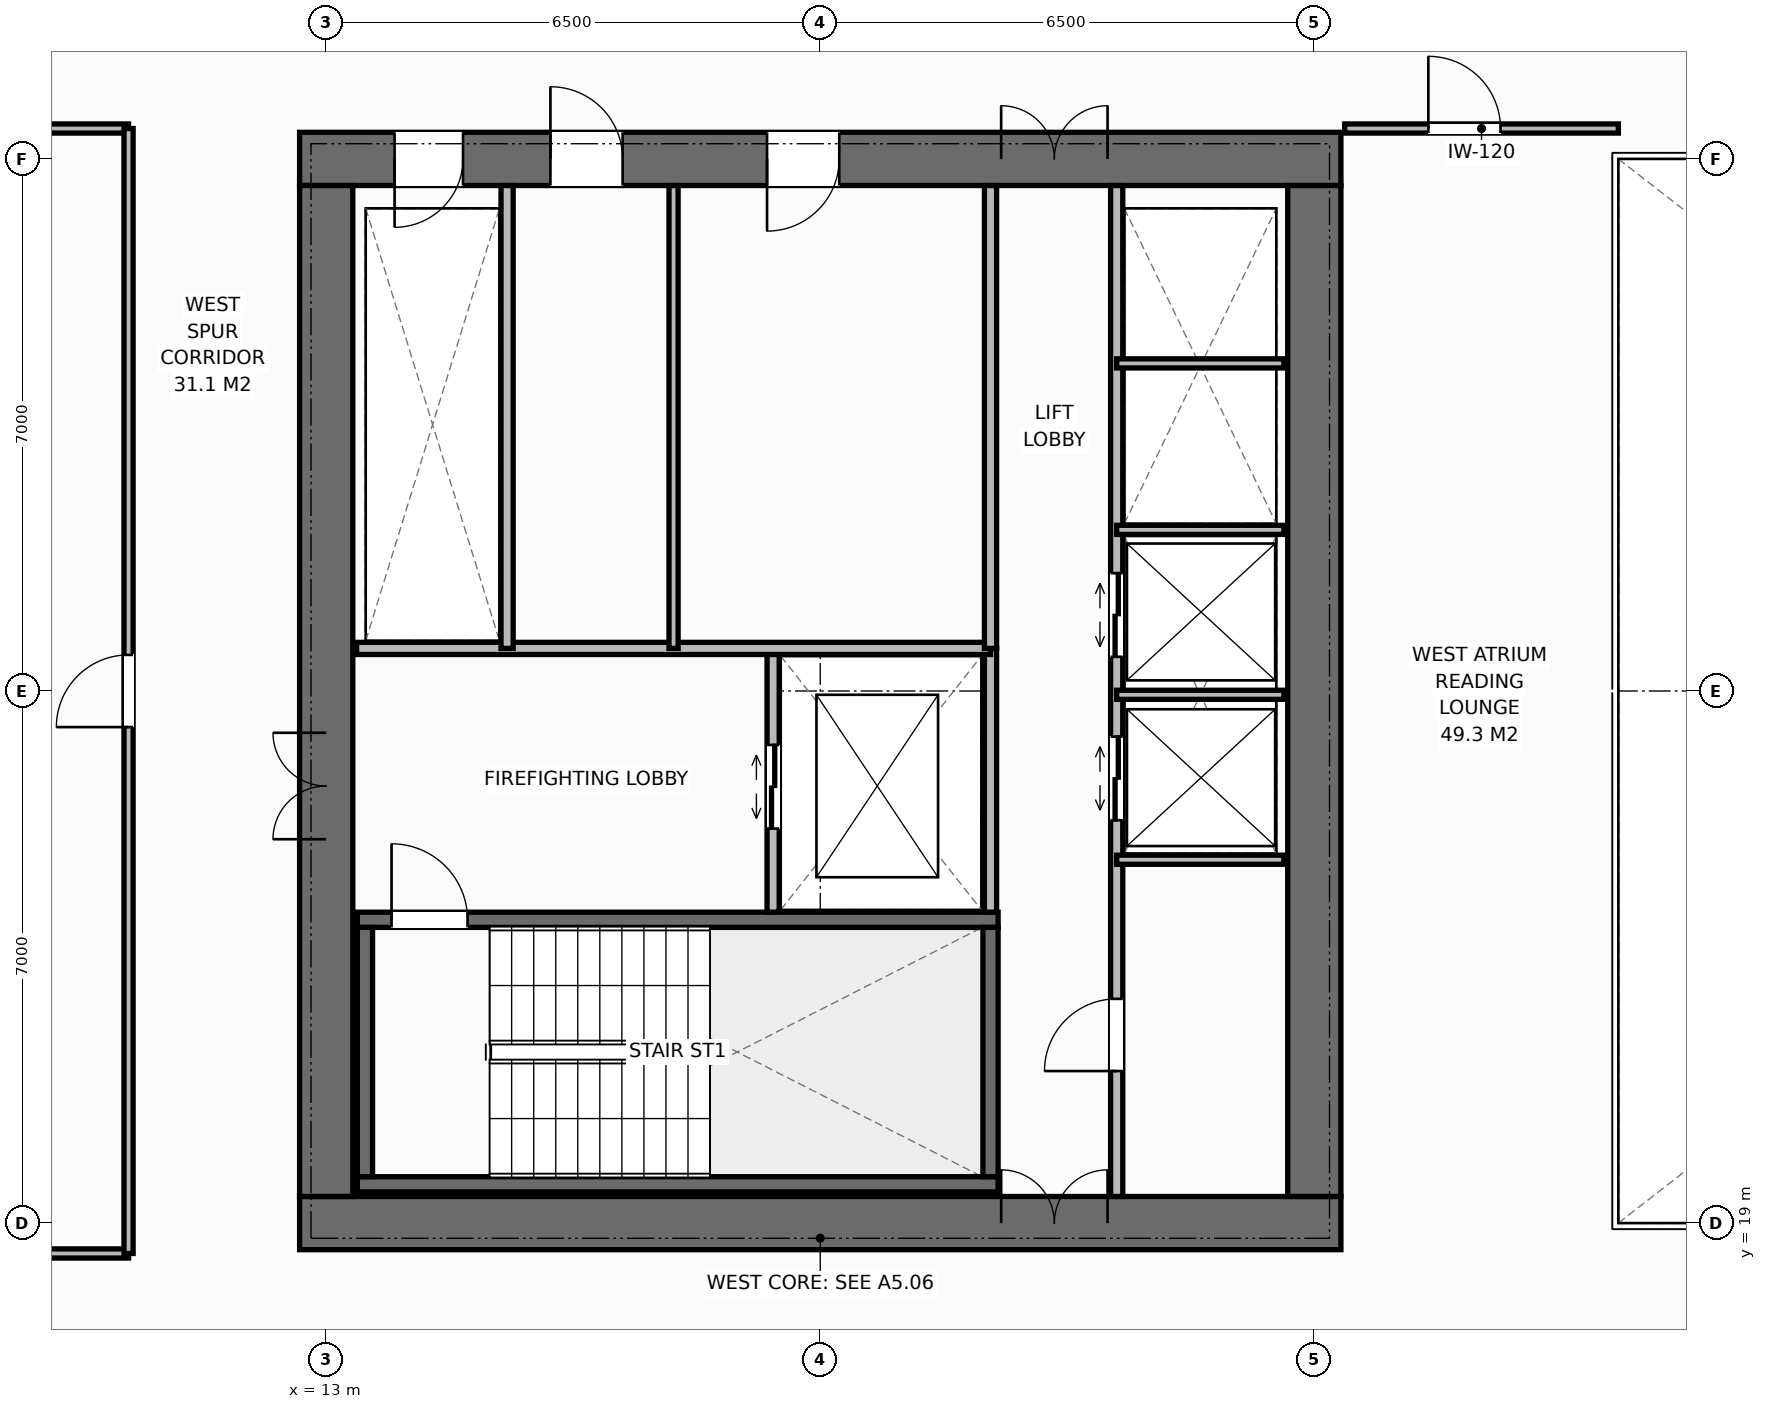
"""IFC4 building model, lengths in metres.
Left out: names, types, materials, properties, quantities, classifications, styles, units other than length and angle.
Written with IfcOpenShell. Run it as: python <this file> out.ifc"""

import sys

from ifc_helpers import new_model, si_unit, direction, frame, frame_2d, origin, place, context, subcontext, project, spatial, rectangle, extrude, element, fill, save


model = new_model("IFC4")
c1 = context("Model", 3, precision=1e-05, world=origin(), true_north=direction((0.0, 1.0)))
c2 = subcontext(c1, "Body", "Model", "MODEL_VIEW")
j1 = project(units=[si_unit("LENGTHUNIT", "METRE"), si_unit("PLANEANGLEUNIT", "RADIAN")], contexts=[c1])
p1 = place(None, origin())
s1 = spatial("IfcSite", under=j1, at=p1, CompositionType="ELEMENT")
p2 = place(p1, origin())
s2 = spatial("IfcBuilding", under=s1, at=p2, CompositionType="ELEMENT")
p3 = place(p2, frame((0.0, 0.0, 135.4)))
s3 = spatial("IfcBuildingStorey", under=s2, at=p3, CompositionType="ELEMENT", Elevation=135.4)
p4 = place(p3, frame((12.65, 19.0, 0.0), z_axis=(0.0, 0.0, 1.0), x_axis=(1.0, 0.0, 0.0)))
e1 = element("IfcWall", 1, at=p4, inside=s3, PredefinedType="SHEAR", context=c2, shape_type="SweptSolid", body=[
    extrude(rectangle(XDim=13.7, YDim=0.7, at=frame_2d((6.85, 0.0))), origin(), (0.0, 0.0, 1.0), 3.8),
])
p5 = place(p4, frame((9.23, 0.0, 0.0)))
e2 = element("IfcOpeningElement", 2, at=p5, cuts=e1, PredefinedType="OPENING", context=c2, shape_type="SweptSolid", body=[
    extrude(rectangle(XDim=1.4, YDim=2.2, at=frame_2d((0.7, 1.1))), frame((0.0, 0.36, 0.0), z_axis=(0.0, -1.0, 0.0), x_axis=(1.0, 0.0, 0.0)), (0.0, 0.0, 1.0), 0.72),
])
p6 = place(p3, frame((12.65, 33.0, 0.0), z_axis=(0.0, 0.0, 1.0), x_axis=(1.0, 0.0, 0.0)))
e3 = element("IfcWall", 3, at=p6, inside=s3, PredefinedType="SHEAR", context=c2, shape_type="SweptSolid", body=[
    extrude(rectangle(XDim=13.7, YDim=0.7, at=frame_2d((6.85, 0.0))), origin(), (0.0, 0.0, 1.0), 3.8),
])
p7 = place(p6, frame((1.25, 0.0, 0.0)))
e4 = element("IfcOpeningElement", 4, at=p7, cuts=e3, PredefinedType="OPENING", context=c2, shape_type="SweptSolid", body=[
    extrude(rectangle(XDim=0.9, YDim=2.15, at=frame_2d((0.45, 1.075))), frame((0.0, 0.36, 0.0), z_axis=(0.0, -1.0, 0.0), x_axis=(1.0, 0.0, 0.0)), (0.0, 0.0, 1.0), 0.72),
])
p8 = place(p6, frame((3.3, 0.0, 0.0)))
e5 = element("IfcOpeningElement", 5, at=p8, cuts=e3, PredefinedType="OPENING", context=c2, shape_type="SweptSolid", body=[
    extrude(rectangle(XDim=0.95, YDim=2.15, at=frame_2d((0.475, 1.075))), frame((0.0, 0.36, 0.0), z_axis=(0.0, -1.0, 0.0), x_axis=(1.0, 0.0, 0.0)), (0.0, 0.0, 1.0), 0.72),
])
p9 = place(p6, frame((6.15, 0.0, 0.0)))
e6 = element("IfcOpeningElement", 6, at=p9, cuts=e3, PredefinedType="OPENING", context=c2, shape_type="SweptSolid", body=[
    extrude(rectangle(XDim=0.95, YDim=2.15, at=frame_2d((0.475, 1.075))), frame((0.0, 0.36, 0.0), z_axis=(0.0, -1.0, 0.0), x_axis=(1.0, 0.0, 0.0)), (0.0, 0.0, 1.0), 0.72),
])
p10 = place(p6, frame((9.23, 0.0, 0.0)))
e7 = element("IfcOpeningElement", 7, at=p10, cuts=e3, PredefinedType="OPENING", context=c2, shape_type="SweptSolid", body=[
    extrude(rectangle(XDim=1.4, YDim=2.2, at=frame_2d((0.7, 1.1))), frame((0.0, 0.36, 0.0), z_axis=(0.0, -1.0, 0.0), x_axis=(1.0, 0.0, 0.0)), (0.0, 0.0, 1.0), 0.72),
])
p11 = place(p3, frame((13.0, 19.35, 0.0), z_axis=(0.0, 0.0, 1.0), x_axis=(0.0, 1.0, 0.0)))
e8 = element("IfcWall", 8, at=p11, inside=s3, PredefinedType="SHEAR", context=c2, shape_type="SweptSolid", body=[
    extrude(rectangle(XDim=13.3, YDim=0.7, at=frame_2d((6.65, 0.0))), origin(), (0.0, 0.0, 1.0), 3.8),
])
p12 = place(p11, frame((4.7, 0.0, 0.0)))
e9 = element("IfcOpeningElement", 9, at=p12, cuts=e8, PredefinedType="OPENING", context=c2, shape_type="SweptSolid", body=[
    extrude(rectangle(XDim=1.4, YDim=2.2, at=frame_2d((0.7, 1.1))), frame((0.0, 0.36, 0.0), z_axis=(0.0, -1.0, 0.0), x_axis=(1.0, 0.0, 0.0)), (0.0, 0.0, 1.0), 0.72),
])
p13 = place(p3, frame((26.0, 19.35, 0.0), z_axis=(0.0, 0.0, 1.0), x_axis=(0.0, 1.0, 0.0)))
e10 = element("IfcWall", 10, at=p13, inside=s3, PredefinedType="SHEAR", context=c2, shape_type="SweptSolid", body=[
    extrude(rectangle(XDim=13.3, YDim=0.7, at=frame_2d((6.65, 0.0))), origin(), (0.0, 0.0, 1.0), 3.8),
])
p14 = place(p3, frame((13.41, 19.51, 0.0), z_axis=(0.0, 0.0, 1.0), x_axis=(1.0, 0.0, 0.0)))
e11 = element("IfcWall", 11, at=p14, inside=s3, PredefinedType="SHEAR", context=c2, shape_type="SweptSolid", body=[
    extrude(rectangle(XDim=8.43, YDim=0.2, at=frame_2d((4.215, 0.0))), origin(), (0.0, 0.0, 1.0), 3.8),
])
p15 = place(p3, frame((13.41, 22.99, 0.0), z_axis=(0.0, 0.0, 1.0), x_axis=(1.0, 0.0, 0.0)))
e12 = element("IfcWall", 12, at=p15, inside=s3, PredefinedType="SHEAR", context=c2, shape_type="SweptSolid", body=[
    extrude(rectangle(XDim=8.43, YDim=0.2, at=frame_2d((4.215, 0.0))), origin(), (0.0, 0.0, 1.0), 3.8),
])
p16 = place(p15, frame((0.45, 0.0, 0.0)))
e13 = element("IfcOpeningElement", 13, at=p16, cuts=e12, PredefinedType="OPENING", context=c2, shape_type="SweptSolid", body=[
    extrude(rectangle(XDim=1.0, YDim=2.15, at=frame_2d((0.5, 1.075))), frame((0.0, 0.11, 0.0), z_axis=(0.0, -1.0, 0.0), x_axis=(1.0, 0.0, 0.0)), (0.0, 0.0, 1.0), 0.22),
])
for number, where, z_axis, x_axis in (
    (14, (13.51, 19.61, 0.0), (0.0, 0.0, 1.0), (0.0, 1.0, 0.0)),
    (15, (21.74, 19.61, 0.0), (0.0, 0.0, 1.0), (0.0, 1.0, 0.0)),
):
    element("IfcWall", number, at=place(p3, frame(where, z_axis=z_axis, x_axis=x_axis)), inside=s3, PredefinedType="SHEAR", context=c2, shape_type="SweptSolid", body=[
        extrude(rectangle(XDim=3.28, YDim=0.2, at=frame_2d((1.64, 0.0))), origin(), (0.0, 0.0, 1.0), 3.8),
    ])
p17 = place(p3, frame((21.74, 23.09, 0.0), z_axis=(0.0, 0.0, 1.0), x_axis=(0.0, 1.0, 0.0)))
e16 = element("IfcWall", 16, at=p17, inside=s3, PredefinedType="STANDARD", context=c2, shape_type="SweptSolid", body=[
    extrude(rectangle(XDim=3.47, YDim=0.16, at=frame_2d((1.735, 0.0))), origin(), (0.0, 0.0, 1.0), 3.52),
])
p18 = place(p3, frame((18.88, 23.09, 0.0), z_axis=(0.0, 0.0, 1.0), x_axis=(0.0, 1.0, 0.0)))
e17 = element("IfcWall", 17, at=p18, inside=s3, PredefinedType="STANDARD", context=c2, shape_type="SweptSolid", body=[
    extrude(rectangle(XDim=3.47, YDim=0.16, at=frame_2d((1.735, 0.0))), origin(), (0.0, 0.0, 1.0), 3.52),
])
p19 = place(p18, frame((1.1, 0.0, 0.0)))
e18 = element("IfcOpeningElement", 18, at=p19, cuts=e17, PredefinedType="OPENING", context=c2, shape_type="SweptSolid", body=[
    extrude(rectangle(XDim=1.1, YDim=2.2, at=frame_2d((0.55, 1.1))), frame((0.0, 0.09, 0.0), z_axis=(0.0, -1.0, 0.0), x_axis=(1.0, 0.0, 0.0)), (0.0, 0.0, 1.0), 0.18),
])
p20 = place(p3, frame((13.4, 26.56, 0.0), z_axis=(0.0, 0.0, 1.0), x_axis=(1.0, 0.0, 0.0)))
e19 = element("IfcWall", 19, at=p20, inside=s3, PredefinedType="STANDARD", context=c2, shape_type="SweptSolid", body=[
    extrude(rectangle(XDim=8.34, YDim=0.16, at=frame_2d((4.17, 0.0))), origin(), (0.0, 0.0, 1.0), 3.52),
])
p21 = place(p3, frame((15.38, 26.56, 0.0), z_axis=(0.0, 0.0, 1.0), x_axis=(0.0, 1.0, 0.0)))
e20 = element("IfcWall", 20, at=p21, inside=s3, PredefinedType="STANDARD", context=c2, shape_type="SweptSolid", body=[
    extrude(rectangle(XDim=6.09, YDim=0.16, at=frame_2d((3.045, 0.0))), origin(), (0.0, 0.0, 1.0), 3.52),
])
p22 = place(p3, frame((17.57, 26.56, 0.0), z_axis=(0.0, 0.0, 1.0), x_axis=(0.0, 1.0, 0.0)))
e21 = element("IfcWall", 21, at=p22, inside=s3, PredefinedType="PARTITIONING", context=c2, shape_type="SweptSolid", body=[
    extrude(rectangle(XDim=6.09, YDim=0.12, at=frame_2d((3.045, 0.0))), origin(), (0.0, 0.0, 1.0), 3.52),
])
p23 = place(p3, frame((21.74, 26.56, 0.0), z_axis=(0.0, 0.0, 1.0), x_axis=(0.0, 1.0, 0.0)))
e22 = element("IfcWall", 22, at=p23, inside=s3, PredefinedType="STANDARD", context=c2, shape_type="SweptSolid", body=[
    extrude(rectangle(XDim=6.09, YDim=0.16, at=frame_2d((3.045, 0.0))), origin(), (0.0, 0.0, 1.0), 3.52),
])
p24 = place(p3, frame((23.4, 19.35, 0.0), z_axis=(0.0, 0.0, 1.0), x_axis=(0.0, 1.0, 0.0)))
e23 = element("IfcWall", 23, at=p24, inside=s3, PredefinedType="STANDARD", context=c2, shape_type="SweptSolid", body=[
    extrude(rectangle(XDim=13.3, YDim=0.16, at=frame_2d((6.65, 0.0))), origin(), (0.0, 0.0, 1.0), 3.52),
])
p25 = place(p24, frame((1.65, 0.0, 0.0)))
e24 = element("IfcOpeningElement", 24, at=p25, cuts=e23, PredefinedType="OPENING", context=c2, shape_type="SweptSolid", body=[
    extrude(rectangle(XDim=0.95, YDim=2.15, at=frame_2d((0.475, 1.075))), frame((0.0, 0.09, 0.0), z_axis=(0.0, -1.0, 0.0), x_axis=(1.0, 0.0, 0.0)), (0.0, 0.0, 1.0), 0.18),
])
p26 = place(p24, frame((4.95, 0.0, 0.0)))
e25 = element("IfcOpeningElement", 25, at=p26, cuts=e23, PredefinedType="OPENING", context=c2, shape_type="SweptSolid", body=[
    extrude(rectangle(XDim=1.1, YDim=2.2, at=frame_2d((0.55, 1.1))), frame((0.0, 0.09, 0.0), z_axis=(0.0, -1.0, 0.0), x_axis=(1.0, 0.0, 0.0)), (0.0, 0.0, 1.0), 0.18),
])
p27 = place(p24, frame((7.1, 0.0, 0.0)))
e26 = element("IfcOpeningElement", 26, at=p27, cuts=e23, PredefinedType="OPENING", context=c2, shape_type="SweptSolid", body=[
    extrude(rectangle(XDim=1.1, YDim=2.2, at=frame_2d((0.55, 1.1))), frame((0.0, 0.09, 0.0), z_axis=(0.0, -1.0, 0.0), x_axis=(1.0, 0.0, 0.0)), (0.0, 0.0, 1.0), 0.18),
])
for number, where, z_axis, x_axis in (
    (27, (23.4, 23.78, 0.0), (0.0, 0.0, 1.0), (1.0, 0.0, 0.0)),
    (28, (23.4, 25.95, 0.0), (0.0, 0.0, 1.0), (1.0, 0.0, 0.0)),
    (29, (23.4, 28.12, 0.0), (0.0, 0.0, 1.0), (1.0, 0.0, 0.0)),
    (30, (23.4, 30.31, 0.0), (0.0, 0.0, 1.0), (1.0, 0.0, 0.0)),
):
    element("IfcWall", number, at=place(p3, frame(where, z_axis=z_axis, x_axis=x_axis)), inside=s3, PredefinedType="PARTITIONING", context=c2, shape_type="SweptSolid", body=[
        extrude(rectangle(XDim=2.2, YDim=0.12, at=frame_2d((1.1, 0.0))), origin(), (0.0, 0.0, 1.0), 3.52),
    ])
p28 = place(p3, frame((26.4, 33.4, 0.0), z_axis=(0.0, 0.0, 1.0), x_axis=(1.0, 0.0, 0.0)))
e31 = element("IfcWall", 31, at=p28, inside=s3, PredefinedType="PARTITIONING", context=c2, shape_type="SweptSolid", body=[
    extrude(rectangle(XDim=3.6, YDim=0.12, at=frame_2d((1.8, 0.0))), origin(), (0.0, 0.0, 1.0), 3.52),
])
p29 = place(p28, frame((1.1, 0.0, 0.0)))
e32 = element("IfcOpeningElement", 32, at=p29, cuts=e31, PredefinedType="OPENING", context=c2, shape_type="SweptSolid", body=[
    extrude(rectangle(XDim=0.95, YDim=2.15, at=frame_2d((0.475, 1.075))), frame((0.0, 0.07, 0.0), z_axis=(0.0, -1.0, 0.0), x_axis=(1.0, 0.0, 0.0)), (0.0, 0.0, 1.0), 0.14),
])
for number, where, z_axis, x_axis in (
    (33, (1.82, 18.6, 0.0), (0.0, 0.0, 1.0), (1.0, 0.0, 0.0)),
    (34, (1.82, 33.4, 0.0), (0.0, 0.0, 1.0), (1.0, 0.0, 0.0)),
):
    element("IfcWall", number, at=place(p3, frame(where, z_axis=z_axis, x_axis=x_axis)), inside=s3, PredefinedType="PARTITIONING", context=c2, shape_type="SweptSolid", body=[
        extrude(rectangle(XDim=8.58, YDim=0.12, at=frame_2d((4.29, 0.0))), origin(), (0.0, 0.0, 1.0), 3.52),
    ])
p30 = place(p3, frame((10.4, 18.6, 0.0), z_axis=(0.0, 0.0, 1.0), x_axis=(0.0, 1.0, 0.0)))
e35 = element("IfcWall", 35, at=p30, inside=s3, PredefinedType="PARTITIONING", context=c2, shape_type="SweptSolid", body=[
    extrude(rectangle(XDim=14.8, YDim=0.12, at=frame_2d((7.4, 0.0))), origin(), (0.0, 0.0, 1.0), 3.52),
])
p31 = place(p30, frame((6.925, 0.0, 0.0)))
e36 = element("IfcOpeningElement", 36, at=p31, cuts=e35, PredefinedType="OPENING", context=c2, shape_type="SweptSolid", body=[
    extrude(rectangle(XDim=0.95, YDim=2.15, at=frame_2d((0.475, 1.075))), frame((0.0, 0.07, 0.0), z_axis=(0.0, -1.0, 0.0), x_axis=(1.0, 0.0, 0.0)), (0.0, 0.0, 1.0), 0.14),
])
p32 = place(p16, origin())
e37 = element("IfcDoor", 37, at=p32, inside=s3, OperationType="SINGLE_SWING_LEFT", PredefinedType="DOOR", context=c2, shape_type="SweptSolid", body=[
    extrude(rectangle(XDim=1.0, YDim=2.15, at=frame_2d((0.5, 1.075))), frame((0.0, 0.025, 0.0), z_axis=(0.0, -1.0, 0.0), x_axis=(1.0, 0.0, 0.0)), (0.0, 0.0, 1.0), 0.05),
])
fill(e13, e37)
p33 = place(p12, origin())
e38 = element("IfcDoor", 38, at=p33, inside=s3, OperationType="DOUBLE_DOOR_SINGLE_SWING", PredefinedType="DOOR", context=c2, shape_type="SweptSolid", body=[
    extrude(rectangle(XDim=1.4, YDim=2.2, at=frame_2d((0.7, 1.1))), frame((0.0, 0.025, 0.0), z_axis=(0.0, -1.0, 0.0), x_axis=(1.0, 0.0, 0.0)), (0.0, 0.0, 1.0), 0.05),
])
fill(e9, e38)
p34 = place(p19, origin())
e39 = element("IfcDoor", 39, at=p34, inside=s3, OperationType="DOUBLE_DOOR_SLIDING", PredefinedType="DOOR", context=c2, shape_type="SweptSolid", body=[
    extrude(rectangle(XDim=1.1, YDim=2.2, at=frame_2d((0.55, 1.1))), frame((0.0, 0.025, 0.0), z_axis=(0.0, -1.0, 0.0), x_axis=(1.0, 0.0, 0.0)), (0.0, 0.0, 1.0), 0.05),
])
fill(e18, e39)
p35 = place(p7, origin())
e40 = element("IfcDoor", 40, at=p35, inside=s3, OperationType="SINGLE_SWING_RIGHT", PredefinedType="DOOR", context=c2, shape_type="SweptSolid", body=[
    extrude(rectangle(XDim=0.9, YDim=2.15, at=frame_2d((0.45, 1.075))), frame((0.0, -0.075, 0.0), z_axis=(0.0, -1.0, 0.0), x_axis=(1.0, 0.0, 0.0)), (0.0, 0.0, 1.0), 0.05),
])
fill(e4, e40)
p36 = place(p8, origin())
e41 = element("IfcDoor", 41, at=p36, inside=s3, OperationType="SINGLE_SWING_LEFT", PredefinedType="DOOR", context=c2, shape_type="SweptSolid", body=[
    extrude(rectangle(XDim=0.95, YDim=2.15, at=frame_2d((0.475, 1.075))), frame((0.0, -0.075, 0.0), z_axis=(0.0, -1.0, 0.0), x_axis=(1.0, 0.0, 0.0)), (0.0, 0.0, 1.0), 0.05),
])
fill(e5, e41)
p37 = place(p9, origin())
e42 = element("IfcDoor", 42, at=p37, inside=s3, OperationType="SINGLE_SWING_RIGHT", PredefinedType="DOOR", context=c2, shape_type="SweptSolid", body=[
    extrude(rectangle(XDim=0.95, YDim=2.15, at=frame_2d((0.475, 1.075))), frame((0.0, -0.075, 0.0), z_axis=(0.0, -1.0, 0.0), x_axis=(1.0, 0.0, 0.0)), (0.0, 0.0, 1.0), 0.05),
])
fill(e6, e42)
p38 = place(p5, origin())
e43 = element("IfcDoor", 43, at=p38, inside=s3, OperationType="DOUBLE_DOOR_SINGLE_SWING", PredefinedType="DOOR", context=c2, shape_type="SweptSolid", body=[
    extrude(rectangle(XDim=1.4, YDim=2.2, at=frame_2d((0.7, 1.1))), frame((0.0, 0.125, 0.0), z_axis=(0.0, -1.0, 0.0), x_axis=(1.0, 0.0, 0.0)), (0.0, 0.0, 1.0), 0.05),
])
fill(e2, e43)
p39 = place(p10, origin())
e44 = element("IfcDoor", 44, at=p39, inside=s3, OperationType="DOUBLE_DOOR_SINGLE_SWING", PredefinedType="DOOR", context=c2, shape_type="SweptSolid", body=[
    extrude(rectangle(XDim=1.4, YDim=2.2, at=frame_2d((0.7, 1.1))), frame((0.0, -0.075, 0.0), z_axis=(0.0, -1.0, 0.0), x_axis=(1.0, 0.0, 0.0)), (0.0, 0.0, 1.0), 0.05),
])
fill(e7, e44)
p40 = place(p25, origin())
e45 = element("IfcDoor", 45, at=p40, inside=s3, OperationType="SINGLE_SWING_LEFT", PredefinedType="DOOR", context=c2, shape_type="SweptSolid", body=[
    extrude(rectangle(XDim=0.95, YDim=2.15, at=frame_2d((0.475, 1.075))), frame((0.0, 0.025, 0.0), z_axis=(0.0, -1.0, 0.0), x_axis=(1.0, 0.0, 0.0)), (0.0, 0.0, 1.0), 0.05),
])
fill(e24, e45)
p41 = place(p26, origin())
e46 = element("IfcDoor", 46, at=p41, inside=s3, OperationType="DOUBLE_DOOR_SLIDING", PredefinedType="DOOR", context=c2, shape_type="SweptSolid", body=[
    extrude(rectangle(XDim=1.1, YDim=2.2, at=frame_2d((0.55, 1.1))), frame((0.0, 0.025, 0.0), z_axis=(0.0, -1.0, 0.0), x_axis=(1.0, 0.0, 0.0)), (0.0, 0.0, 1.0), 0.05),
])
fill(e25, e46)
p42 = place(p27, origin())
e47 = element("IfcDoor", 47, at=p42, inside=s3, OperationType="DOUBLE_DOOR_SLIDING", PredefinedType="DOOR", context=c2, shape_type="SweptSolid", body=[
    extrude(rectangle(XDim=1.1, YDim=2.2, at=frame_2d((0.55, 1.1))), frame((0.0, 0.025, 0.0), z_axis=(0.0, -1.0, 0.0), x_axis=(1.0, 0.0, 0.0)), (0.0, 0.0, 1.0), 0.05),
])
fill(e26, e47)
p43 = place(p29, origin())
e48 = element("IfcDoor", 48, at=p43, inside=s3, OperationType="SINGLE_SWING_LEFT", PredefinedType="DOOR", context=c2, shape_type="SweptSolid", body=[
    extrude(rectangle(XDim=0.95, YDim=2.15, at=frame_2d((0.475, 1.075))), frame((0.0, 0.025, 0.0), z_axis=(0.0, -1.0, 0.0), x_axis=(1.0, 0.0, 0.0)), (0.0, 0.0, 1.0), 0.05),
])
fill(e32, e48)
p44 = place(p31, origin())
e49 = element("IfcDoor", 49, at=p44, inside=s3, OperationType="SINGLE_SWING_LEFT", PredefinedType="DOOR", context=c2, shape_type="SweptSolid", body=[
    extrude(rectangle(XDim=0.95, YDim=2.15, at=frame_2d((0.475, 1.075))), frame((0.0, 0.025, 0.0), z_axis=(0.0, -1.0, 0.0), x_axis=(1.0, 0.0, 0.0)), (0.0, 0.0, 1.0), 0.05),
])
fill(e36, e49)
save(model, sys.argv[1])
